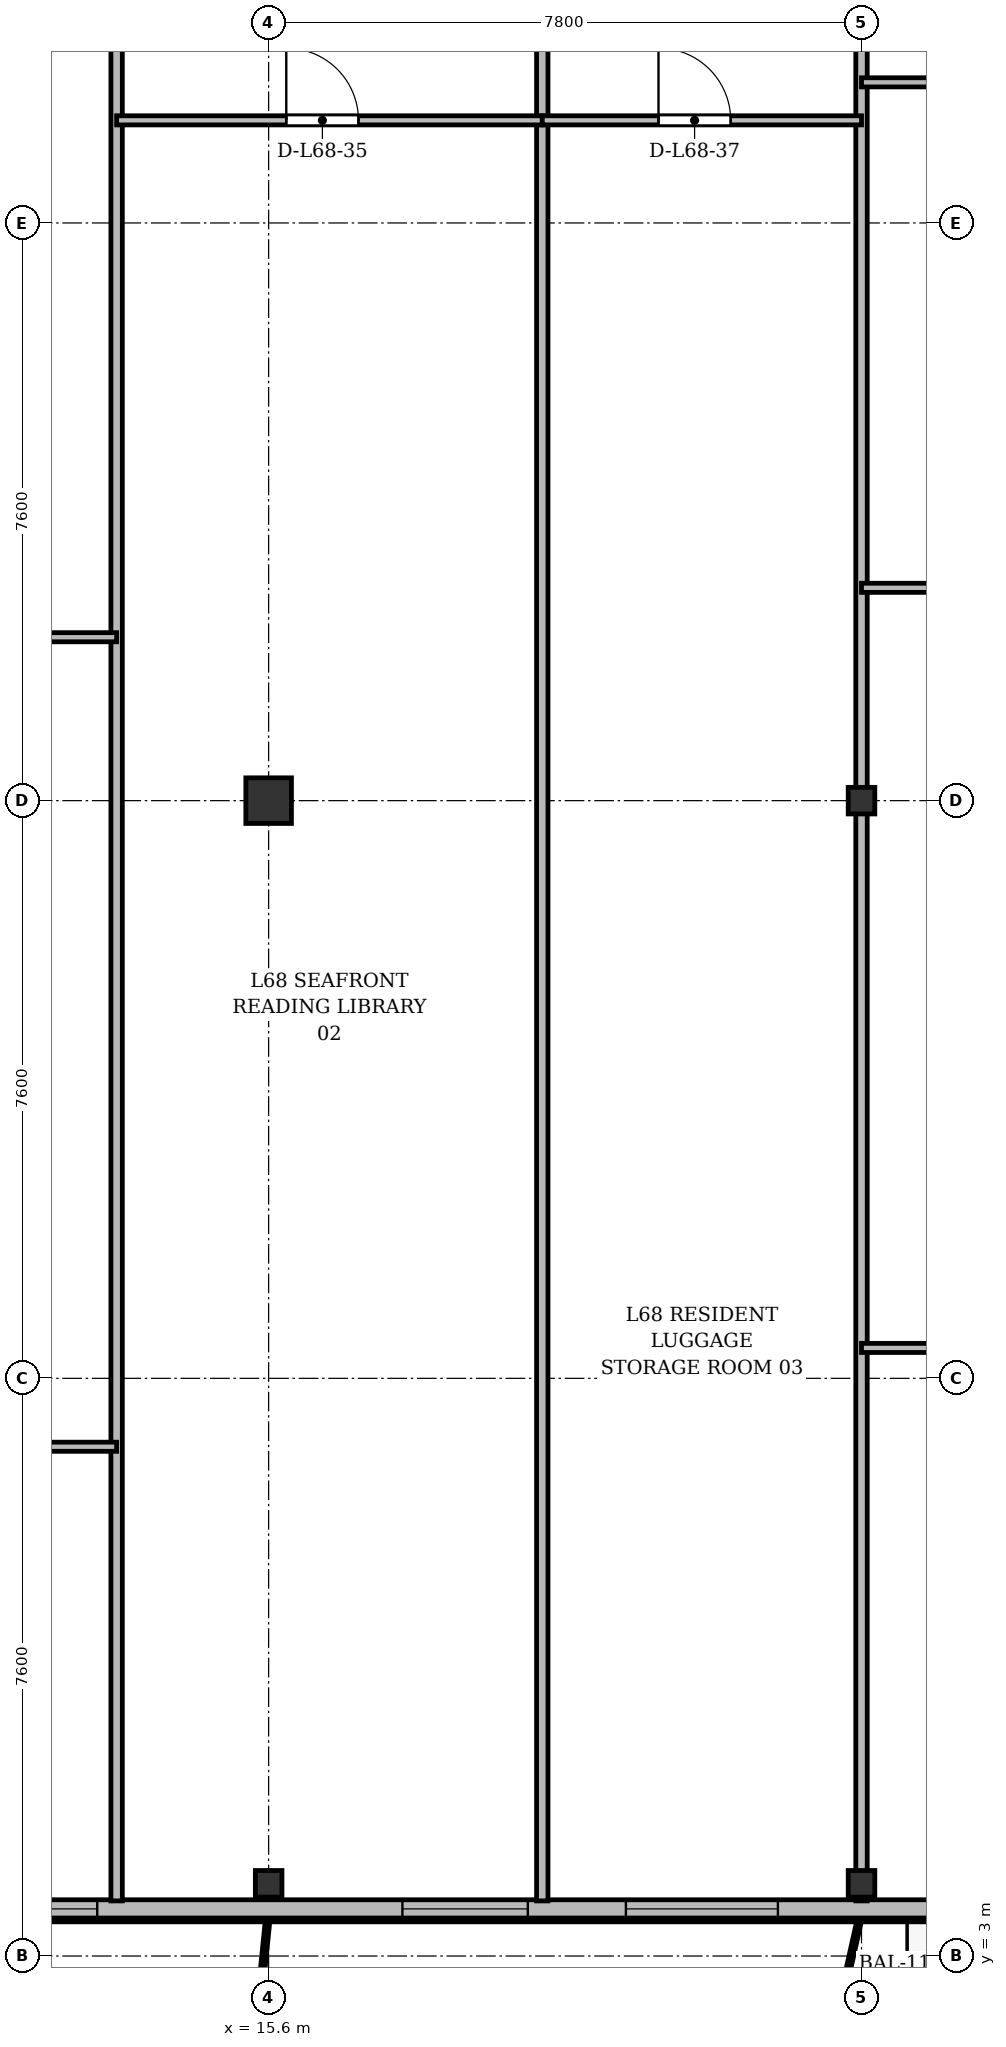
"""IFC4 building model, lengths in metres.
Left out: names, types, materials, properties, quantities, classifications, styles, units other than length and angle.
Written with IfcOpenShell. Run it as: python <this file> out.ifc"""

import sys

from ifc_helpers import new_model, si_unit, direction, frame, frame_2d, origin, origin_2d, place, context, subcontext, project, spatial, rectangle, i_section, extrude, source, transform, mapped, element, fill, save


model = new_model("IFC4")
c1 = context("Model", 3, precision=1e-05, world=origin(), true_north=direction((0.0, 1.0)))
c2 = subcontext(c1, "Body", "Model", "MODEL_VIEW")
j1 = project(units=[si_unit("LENGTHUNIT", "METRE"), si_unit("PLANEANGLEUNIT", "RADIAN")], contexts=[c1])
p1 = place(None, origin())
s1 = spatial("IfcSite", under=j1, at=p1, CompositionType="ELEMENT")
p2 = place(p1, origin())
s2 = spatial("IfcBuilding", under=s1, at=p2, CompositionType="ELEMENT")
p3 = place(p2, frame((0.0, 0.0, 263.1)))
s3 = spatial("IfcBuildingStorey", under=s2, at=p3, CompositionType="ELEMENT", Elevation=263.1)
m1 = source(origin(), c2, "Body", "SweptSolid", [
    extrude(i_section(OverallWidth=0.35, OverallDepth=0.35, WebThickness=0.018, FlangeThickness=0.028, at=origin_2d()), origin(), (0.0, 0.0, 1.0), 3.6),
])
p4 = place(p3, frame((15.6, 3.95, 0.0), z_axis=(0.0, 0.0, 1.0), x_axis=(1.0, 0.0, 0.0)))
e1 = element("IfcColumn", 1, at=p4, inside=s3, PredefinedType="COLUMN", context=c2, shape_type="MappedRepresentation", body=[
    mapped(m1, transform((0.0, 0.0, 0.0), x_axis=(1.0, 0.0, 0.0), y_axis=(0.0, 1.0, 0.0), z_axis=(0.0, 0.0, 1.0), scale=1.0)),
])
m2 = source(origin(), c2, "Body", "SweptSolid", [
    extrude(rectangle(XDim=0.6, YDim=0.6, at=origin_2d()), origin(), (0.0, 0.0, 1.0), 3.6),
])
p5 = place(p3, frame((15.6, 18.2, 0.0), z_axis=(0.0, 0.0, 1.0), x_axis=(1.0, 0.0, 0.0)))
e2 = element("IfcColumn", 2, at=p5, inside=s3, PredefinedType="COLUMN", context=c2, shape_type="MappedRepresentation", body=[
    mapped(m2, transform((0.0, 0.0, 0.0), x_axis=(1.0, 0.0, 0.0), y_axis=(0.0, 1.0, 0.0), z_axis=(0.0, 0.0, 1.0), scale=1.0)),
])
for number, where, z_axis, x_axis in (
    (3, (23.4, 3.95, 0.0), (0.0, 0.0, 1.0), (1.0, 0.0, 0.0)),
    (4, (23.4, 18.2, 0.0), (0.0, 0.0, 1.0), (1.0, 0.0, 0.0)),
):
    element("IfcColumn", number, at=place(p3, frame(where, z_axis=z_axis, x_axis=x_axis)), inside=s3, PredefinedType="COLUMN", context=c2, shape_type="MappedRepresentation", body=[
        mapped(m1, transform((0.0, 0.0, 0.0), x_axis=(1.0, 0.0, 0.0), y_axis=(0.0, 1.0, 0.0), z_axis=(0.0, 0.0, 1.0), scale=1.0)),
    ])
p6 = place(p3, frame((63.2, 3.62, 0.0), z_axis=(0.0, 0.0, 1.0), x_axis=(-1.0, 0.0, 0.0)))
e5 = element("IfcWall", 5, at=p6, inside=s3, PredefinedType="SOLIDWALL", context=c2, shape_type="SweptSolid", body=[
    extrude(rectangle(XDim=52.0, YDim=0.24, at=frame_2d((26.0, 0.0))), origin(), (0.0, 0.0, 1.0), 3.37),
])
p7 = place(p6, frame((0.345, 0.0, 0.9)))
e6 = element("IfcOpeningElement", 6, at=p7, cuts=e5, PredefinedType="OPENING", context=c2, shape_type="SweptSolid", body=[
    extrude(rectangle(XDim=1.2, YDim=1.65, at=frame_2d((0.6, 0.825))), frame((0.0, 0.13, 0.0), z_axis=(0.0, -1.0, 0.0), x_axis=(1.0, 0.0, 0.0)), (0.0, 0.0, 1.0), 0.26),
])
p8 = place(p6, frame((2.225, 0.0, 0.9)))
e7 = element("IfcOpeningElement", 7, at=p8, cuts=e5, PredefinedType="OPENING", context=c2, shape_type="SweptSolid", body=[
    extrude(rectangle(XDim=1.65, YDim=1.85, at=frame_2d((0.825, 0.925))), frame((0.0, 0.13, 0.0), z_axis=(0.0, -1.0, 0.0), x_axis=(1.0, 0.0, 0.0)), (0.0, 0.0, 1.0), 0.26),
])
p9 = place(p6, frame((5.42, 0.0, 0.0)))
e8 = element("IfcOpeningElement", 8, at=p9, cuts=e5, PredefinedType="OPENING", context=c2, shape_type="SweptSolid", body=[
    extrude(rectangle(XDim=1.2, YDim=2.2, at=frame_2d((0.6, 1.1))), frame((0.0, 0.13, 0.0), z_axis=(0.0, -1.0, 0.0), x_axis=(1.0, 0.0, 0.0)), (0.0, 0.0, 1.0), 0.26),
])
p10 = place(p6, frame((8.4, 0.0, 0.9)))
e9 = element("IfcOpeningElement", 9, at=p10, cuts=e5, PredefinedType="OPENING", context=c2, shape_type="SweptSolid", body=[
    extrude(rectangle(XDim=2.2, YDim=1.8, at=frame_2d((1.1, 0.9))), frame((0.0, 0.13, 0.0), z_axis=(0.0, -1.0, 0.0), x_axis=(1.0, 0.0, 0.0)), (0.0, 0.0, 1.0), 0.26),
])
p11 = place(p6, frame((15.05, 0.0, 0.9)))
e10 = element("IfcOpeningElement", 10, at=p11, cuts=e5, PredefinedType="OPENING", context=c2, shape_type="SweptSolid", body=[
    extrude(rectangle(XDim=1.5, YDim=1.75, at=frame_2d((0.75, 0.875))), frame((0.0, 0.13, 0.0), z_axis=(0.0, -1.0, 0.0), x_axis=(1.0, 0.0, 0.0)), (0.0, 0.0, 1.0), 0.26),
])
p12 = place(p6, frame((20.25, 0.0, 0.9)))
e11 = element("IfcOpeningElement", 11, at=p12, cuts=e5, PredefinedType="OPENING", context=c2, shape_type="SweptSolid", body=[
    extrude(rectangle(XDim=2.0, YDim=1.95, at=frame_2d((1.0, 0.975))), frame((0.0, 0.13, 0.0), z_axis=(0.0, -1.0, 0.0), x_axis=(1.0, 0.0, 0.0)), (0.0, 0.0, 1.0), 0.26),
])
p13 = place(p6, frame((24.125, 0.0, 0.9)))
e12 = element("IfcOpeningElement", 12, at=p13, cuts=e5, PredefinedType="OPENING", context=c2, shape_type="SweptSolid", body=[
    extrude(rectangle(XDim=1.65, YDim=1.85, at=frame_2d((0.825, 0.925))), frame((0.0, 0.13, 0.0), z_axis=(0.0, -1.0, 0.0), x_axis=(1.0, 0.0, 0.0)), (0.0, 0.0, 1.0), 0.26),
])
p14 = place(p6, frame((28.8, 0.0, 0.9)))
e13 = element("IfcOpeningElement", 13, at=p14, cuts=e5, PredefinedType="OPENING", context=c2, shape_type="SweptSolid", body=[
    extrude(rectangle(XDim=1.8, YDim=1.8, at=frame_2d((0.9, 0.9))), frame((0.0, 0.13, 0.0), z_axis=(0.0, -1.0, 0.0), x_axis=(1.0, 0.0, 0.0)), (0.0, 0.0, 1.0), 0.26),
])
p15 = place(p6, frame((34.078, 0.0, 0.0)))
e14 = element("IfcOpeningElement", 14, at=p15, cuts=e5, PredefinedType="OPENING", context=c2, shape_type="SweptSolid", body=[
    extrude(rectangle(XDim=1.2, YDim=2.2, at=frame_2d((0.6, 1.1))), frame((0.0, 0.13, 0.0), z_axis=(0.0, -1.0, 0.0), x_axis=(1.0, 0.0, 0.0)), (0.0, 0.0, 1.0), 0.26),
])
p16 = place(p6, frame((37.25, 0.0, 0.9)))
e15 = element("IfcOpeningElement", 15, at=p16, cuts=e5, PredefinedType="OPENING", context=c2, shape_type="SweptSolid", body=[
    extrude(rectangle(XDim=1.5, YDim=1.75, at=frame_2d((0.75, 0.875))), frame((0.0, 0.13, 0.0), z_axis=(0.0, -1.0, 0.0), x_axis=(1.0, 0.0, 0.0)), (0.0, 0.0, 1.0), 0.26),
])
p17 = place(p6, frame((40.9, 0.0, 0.9)))
e16 = element("IfcOpeningElement", 16, at=p17, cuts=e5, PredefinedType="OPENING", context=c2, shape_type="SweptSolid", body=[
    extrude(rectangle(XDim=2.0, YDim=1.95, at=frame_2d((1.0, 0.975))), frame((0.0, 0.13, 0.0), z_axis=(0.0, -1.0, 0.0), x_axis=(1.0, 0.0, 0.0)), (0.0, 0.0, 1.0), 0.26),
])
p18 = place(p6, frame((44.19, 0.0, 0.9)))
e17 = element("IfcOpeningElement", 17, at=p18, cuts=e5, PredefinedType="OPENING", context=c2, shape_type="SweptSolid", body=[
    extrude(rectangle(XDim=1.65, YDim=1.85, at=frame_2d((0.825, 0.925))), frame((0.0, 0.13, 0.0), z_axis=(0.0, -1.0, 0.0), x_axis=(1.0, 0.0, 0.0)), (0.0, 0.0, 1.0), 0.26),
])
p19 = place(p6, frame((49.855, 0.0, 0.9)))
e18 = element("IfcOpeningElement", 18, at=p19, cuts=e5, PredefinedType="OPENING", context=c2, shape_type="SweptSolid", body=[
    extrude(rectangle(XDim=1.8, YDim=1.8, at=frame_2d((0.9, 0.9))), frame((0.0, 0.13, 0.0), z_axis=(0.0, -1.0, 0.0), x_axis=(1.0, 0.0, 0.0)), (0.0, 0.0, 1.0), 0.26),
])
for number, where, z_axis, x_axis in (
    (19, (13.6, 3.725, 0.0), (0.0, 0.0, 1.0), (0.0, 1.0, 0.0)),
    (20, (19.2, 3.725, 0.0), (0.0, 0.0, 1.0), (0.0, 1.0, 0.0)),
):
    element("IfcWall", number, at=place(p3, frame(where, z_axis=z_axis, x_axis=x_axis)), inside=s3, PredefinedType="PARTITIONING", context=c2, shape_type="SweptSolid", body=[
        extrude(rectangle(XDim=27.275, YDim=0.15, at=frame_2d((13.637, 0.0))), origin(), (0.0, 0.0, 1.0), 2.92),
    ])
p20 = place(p3, frame((23.4, 3.725, 0.0), z_axis=(0.0, 0.0, 1.0), x_axis=(0.0, 1.0, 0.0)))
e21 = element("IfcWall", 21, at=p20, inside=s3, PredefinedType="PARTITIONING", context=c2, shape_type="SweptSolid", body=[
    extrude(rectangle(XDim=27.275, YDim=0.15, at=frame_2d((13.637, 0.0))), origin(), (0.0, 0.0, 1.0), 2.87),
])
p21 = place(p3, frame((8.44, 20.35, 0.0), z_axis=(0.0, 0.0, 1.0), x_axis=(1.0, 0.0, 0.0)))
e22 = element("IfcWall", 22, at=p21, inside=s3, PredefinedType="PARTITIONING", context=c2, shape_type="SweptSolid", body=[
    extrude(rectangle(XDim=5.16, YDim=0.12, at=frame_2d((2.58, 0.0))), origin(), (0.0, 0.0, 1.0), 2.87),
])
p22 = place(p21, frame((2.014, 0.0, 0.0)))
e23 = element("IfcOpeningElement", 23, at=p22, cuts=e22, PredefinedType="OPENING", context=c2, shape_type="SweptSolid", body=[
    extrude(rectangle(XDim=0.95, YDim=2.15, at=frame_2d((0.475, 1.075))), frame((0.0, 0.07, 0.0), z_axis=(0.0, -1.0, 0.0), x_axis=(1.0, 0.0, 0.0)), (0.0, 0.0, 1.0), 0.14),
])
p23 = place(p3, frame((8.44, 9.7, 0.0), z_axis=(0.0, 0.0, 1.0), x_axis=(1.0, 0.0, 0.0)))
e24 = element("IfcWall", 24, at=p23, inside=s3, PredefinedType="PARTITIONING", context=c2, shape_type="SweptSolid", body=[
    extrude(rectangle(XDim=5.16, YDim=0.12, at=frame_2d((2.58, 0.0))), origin(), (0.0, 0.0, 1.0), 2.87),
])
p24 = place(p23, frame((2.014, 0.0, 0.0)))
e25 = element("IfcOpeningElement", 25, at=p24, cuts=e24, PredefinedType="OPENING", context=c2, shape_type="SweptSolid", body=[
    extrude(rectangle(XDim=0.95, YDim=2.15, at=frame_2d((0.475, 1.075))), frame((0.0, 0.07, 0.0), z_axis=(0.0, -1.0, 0.0), x_axis=(1.0, 0.0, 0.0)), (0.0, 0.0, 1.0), 0.14),
])
p25 = place(p3, frame((13.6, 27.15, 0.0), z_axis=(0.0, 0.0, 1.0), x_axis=(1.0, 0.0, 0.0)))
e26 = element("IfcWall", 26, at=p25, inside=s3, PredefinedType="PARTITIONING", context=c2, shape_type="SweptSolid", body=[
    extrude(rectangle(XDim=5.6, YDim=0.12, at=frame_2d((2.8, 0.0))), origin(), (0.0, 0.0, 1.0), 2.87),
])
p26 = place(p25, frame((2.232, 0.0, 0.0)))
e27 = element("IfcOpeningElement", 27, at=p26, cuts=e26, PredefinedType="OPENING", context=c2, shape_type="SweptSolid", body=[
    extrude(rectangle(XDim=0.95, YDim=2.15, at=frame_2d((0.475, 1.075))), frame((0.0, 0.07, 0.0), z_axis=(0.0, -1.0, 0.0), x_axis=(1.0, 0.0, 0.0)), (0.0, 0.0, 1.0), 0.14),
])
p27 = place(p3, frame((19.2, 27.15, 0.0), z_axis=(0.0, 0.0, 1.0), x_axis=(1.0, 0.0, 0.0)))
e28 = element("IfcWall", 28, at=p27, inside=s3, PredefinedType="PARTITIONING", context=c2, shape_type="SweptSolid", body=[
    extrude(rectangle(XDim=4.2, YDim=0.12, at=frame_2d((2.1, 0.0))), origin(), (0.0, 0.0, 1.0), 2.87),
])
p28 = place(p27, frame((1.529, 0.0, 0.0)))
e29 = element("IfcOpeningElement", 29, at=p28, cuts=e28, PredefinedType="OPENING", context=c2, shape_type="SweptSolid", body=[
    extrude(rectangle(XDim=0.95, YDim=2.15, at=frame_2d((0.475, 1.075))), frame((0.0, 0.07, 0.0), z_axis=(0.0, -1.0, 0.0), x_axis=(1.0, 0.0, 0.0)), (0.0, 0.0, 1.0), 0.14),
])
p29 = place(p3, frame((23.4, 21.0, 0.0), z_axis=(0.0, 0.0, 1.0), x_axis=(1.0, 0.0, 0.0)))
e30 = element("IfcWall", 30, at=p29, inside=s3, PredefinedType="PARTITIONING", context=c2, shape_type="SweptSolid", body=[
    extrude(rectangle(XDim=7.2, YDim=0.12, at=frame_2d((3.6, 0.0))), origin(), (0.0, 0.0, 1.0), 2.87),
])
p30 = place(p29, frame((3.125, 0.0, 0.0)))
e31 = element("IfcOpeningElement", 31, at=p30, cuts=e30, PredefinedType="OPENING", context=c2, shape_type="SweptSolid", body=[
    extrude(rectangle(XDim=0.95, YDim=2.15, at=frame_2d((0.475, 1.075))), frame((0.0, 0.07, 0.0), z_axis=(0.0, -1.0, 0.0), x_axis=(1.0, 0.0, 0.0)), (0.0, 0.0, 1.0), 0.14),
])
p31 = place(p3, frame((23.4, 27.65, 0.0), z_axis=(0.0, 0.0, 1.0), x_axis=(1.0, 0.0, 0.0)))
e32 = element("IfcWall", 32, at=p31, inside=s3, PredefinedType="PARTITIONING", context=c2, shape_type="SweptSolid", body=[
    extrude(rectangle(XDim=2.4, YDim=0.12, at=frame_2d((1.2, 0.0))), origin(), (0.0, 0.0, 1.0), 2.87),
])
p32 = place(p3, frame((23.4, 11.0, 0.0), z_axis=(0.0, 0.0, 1.0), x_axis=(1.0, 0.0, 0.0)))
e33 = element("IfcWall", 33, at=p32, inside=s3, PredefinedType="PARTITIONING", context=c2, shape_type="SweptSolid", body=[
    extrude(rectangle(XDim=3.6, YDim=0.12, at=frame_2d((1.8, 0.0))), origin(), (0.0, 0.0, 1.0), 2.87),
])
p33 = place(p32, frame((1.325, 0.0, 0.0)))
e34 = element("IfcOpeningElement", 34, at=p33, cuts=e33, PredefinedType="OPENING", context=c2, shape_type="SweptSolid", body=[
    extrude(rectangle(XDim=0.95, YDim=2.15, at=frame_2d((0.475, 1.075))), frame((0.0, 0.07, 0.0), z_axis=(0.0, -1.0, 0.0), x_axis=(1.0, 0.0, 0.0)), (0.0, 0.0, 1.0), 0.14),
])
m3 = source(origin(), c2, "Body", "SweptSolid", [
    extrude(rectangle(XDim=2.0, YDim=1.95, at=frame_2d((1.0, 0.975))), frame((0.0, 0.03, 0.0), z_axis=(0.0, -1.0, 0.0), x_axis=(1.0, 0.0, 0.0)), (0.0, 0.0, 1.0), 0.06),
])
p34 = place(p17, origin())
e35 = element("IfcWindow", 35, at=p34, inside=s3, PartitioningType="SINGLE_PANEL", PredefinedType="WINDOW", context=c2, shape_type="MappedRepresentation", body=[
    mapped(m3, transform((0.0, 0.0, 0.0), x_axis=(1.0, 0.0, 0.0), y_axis=(0.0, 1.0, 0.0), z_axis=(0.0, 0.0, 1.0), scale=1.0)),
])
fill(e16, e35)
m4 = source(origin(), c2, "Body", "SweptSolid", [
    extrude(rectangle(XDim=1.65, YDim=1.85, at=frame_2d((0.825, 0.925))), frame((0.0, 0.03, 0.0), z_axis=(0.0, -1.0, 0.0), x_axis=(1.0, 0.0, 0.0)), (0.0, 0.0, 1.0), 0.06),
])
p35 = place(p18, origin())
e36 = element("IfcWindow", 36, at=p35, inside=s3, PartitioningType="SINGLE_PANEL", PredefinedType="WINDOW", context=c2, shape_type="MappedRepresentation", body=[
    mapped(m4, transform((0.0, 0.0, 0.0), x_axis=(1.0, 0.0, 0.0), y_axis=(0.0, 1.0, 0.0), z_axis=(0.0, 0.0, 1.0), scale=1.0)),
])
fill(e17, e36)
m5 = source(origin(), c2, "Body", "SweptSolid", [
    extrude(rectangle(XDim=1.8, YDim=1.8, at=frame_2d((0.9, 0.9))), frame((0.0, 0.03, 0.0), z_axis=(0.0, -1.0, 0.0), x_axis=(1.0, 0.0, 0.0)), (0.0, 0.0, 1.0), 0.06),
])
p36 = place(p19, origin())
e37 = element("IfcWindow", 37, at=p36, inside=s3, PartitioningType="SINGLE_PANEL", PredefinedType="WINDOW", context=c2, shape_type="MappedRepresentation", body=[
    mapped(m5, transform((0.0, 0.0, 0.0), x_axis=(1.0, 0.0, 0.0), y_axis=(0.0, 1.0, 0.0), z_axis=(0.0, 0.0, 1.0), scale=1.0)),
])
fill(e18, e37)
m6 = source(origin(), c2, "Body", "SweptSolid", [
    extrude(rectangle(XDim=0.95, YDim=2.15, at=frame_2d((0.475, 1.075))), frame((0.0, 0.025, 0.0), z_axis=(0.0, -1.0, 0.0), x_axis=(1.0, 0.0, 0.0)), (0.0, 0.0, 1.0), 0.05),
])
p37 = place(p26, origin())
e38 = element("IfcDoor", 38, at=p37, inside=s3, OperationType="SINGLE_SWING_LEFT", PredefinedType="DOOR", context=c2, shape_type="MappedRepresentation", body=[
    mapped(m6, transform((0.0, 0.0, 0.0), x_axis=(1.0, 0.0, 0.0), y_axis=(0.0, 1.0, 0.0), z_axis=(0.0, 0.0, 1.0), scale=1.0)),
])
fill(e27, e38)
p38 = place(p28, origin())
e39 = element("IfcDoor", 39, at=p38, inside=s3, OperationType="SINGLE_SWING_LEFT", PredefinedType="DOOR", context=c2, shape_type="MappedRepresentation", body=[
    mapped(m6, transform((0.0, 0.0, 0.0), x_axis=(1.0, 0.0, 0.0), y_axis=(0.0, 1.0, 0.0), z_axis=(0.0, 0.0, 1.0), scale=1.0)),
])
fill(e29, e39)
save(model, sys.argv[1])
